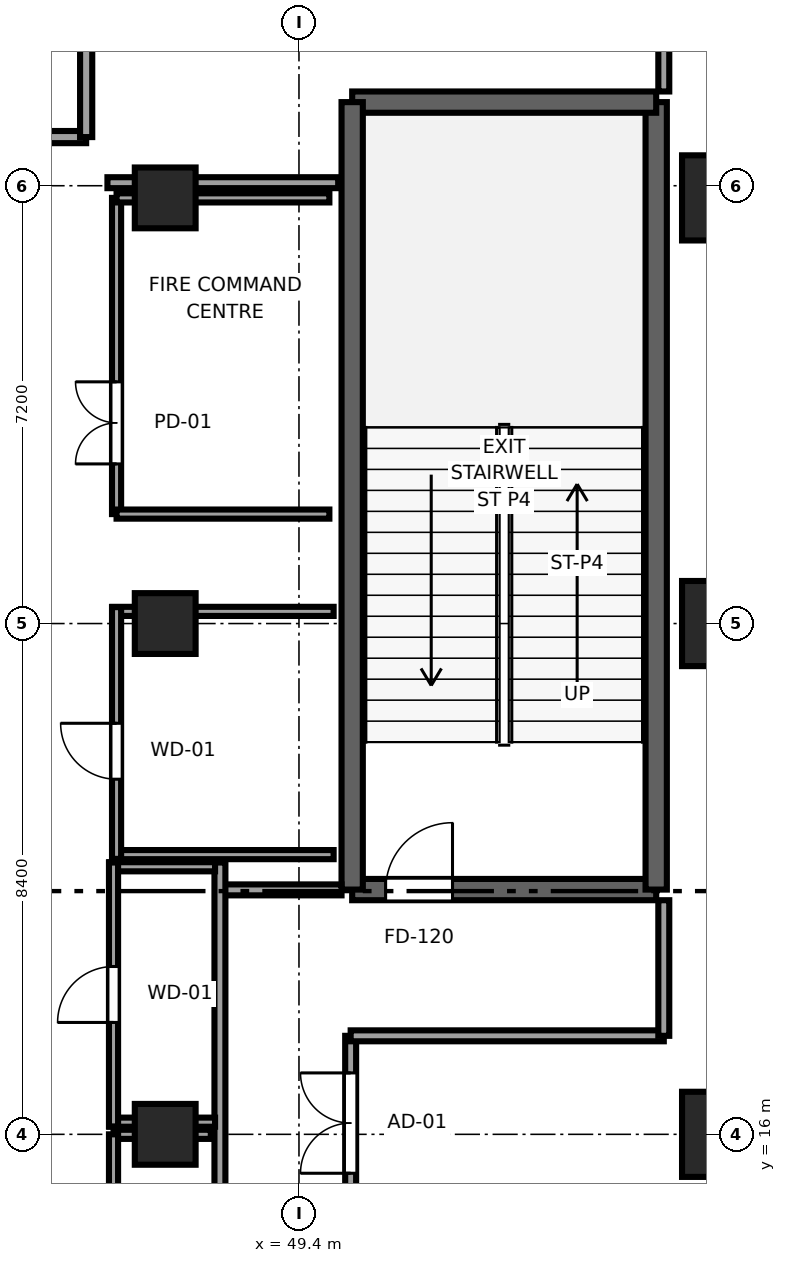
"""IFC4 building model, lengths in metres.
Left out: names, types, materials, properties, quantities, classifications, styles, units other than length and angle.
Written with IfcOpenShell. Run it as: python <this file> out.ifc"""

import sys

from ifc_helpers import new_model, si_unit, direction, frame, frame_2d, origin, origin_2d, place, context, subcontext, project, spatial, rectangle, extrude, source, transform, mapped, element, fill, save


model = new_model("IFC4")
c1 = context("Model", 3, precision=1e-05, world=origin(), true_north=direction((0.0, 1.0)))
c2 = subcontext(c1, "Body", "Model", "MODEL_VIEW")
j1 = project(units=[si_unit("LENGTHUNIT", "METRE"), si_unit("PLANEANGLEUNIT", "RADIAN")], contexts=[c1])
p1 = place(None, origin())
s1 = spatial("IfcSite", under=j1, at=p1, CompositionType="ELEMENT")
p2 = place(p1, origin())
s2 = spatial("IfcBuilding", under=s1, at=p2, CompositionType="ELEMENT")
p3 = place(p2, origin())
s3 = spatial("IfcBuildingStorey", under=s2, at=p3, CompositionType="ELEMENT", Elevation=0.0)
p4 = place(p3, frame((50.275, 20.025, 0.0), z_axis=(0.0, 0.0, 1.0), x_axis=(1.0, 0.0, 0.0)))
e1 = element("IfcWall", 1, at=p4, inside=s3, PredefinedType="SHEAR", context=c2, shape_type="SweptSolid", body=[
    extrude(rectangle(XDim=5.0, YDim=0.35, at=frame_2d((2.5, 0.0))), origin(), (0.0, 0.0, 1.0), 6.0),
])
p5 = place(p4, frame((1.65, 0.0, 0.0), z_axis=(0.0, 0.0, 1.0), x_axis=(-1.0, 0.0, 0.0)))
e2 = element("IfcOpeningElement", 2, at=p5, cuts=e1, PredefinedType="OPENING", context=c2, shape_type="SweptSolid", body=[
    extrude(rectangle(XDim=1.1, YDim=2.12, at=frame_2d((0.55, 1.06))), frame((0.0, 0.185, 0.0), z_axis=(0.0, -1.0, 0.0), x_axis=(1.0, 0.0, 0.0)), (0.0, 0.0, 1.0), 0.37),
])
p6 = place(p3, frame((55.275, 20.025, 0.0), z_axis=(0.0, 0.0, 1.0), x_axis=(0.0, 1.0, 0.0)))
e3 = element("IfcWall", 3, at=p6, inside=s3, PredefinedType="SHEAR", context=c2, shape_type="SweptSolid", body=[
    extrude(rectangle(XDim=12.95, YDim=0.35, at=frame_2d((6.475, 0.0))), origin(), (0.0, 0.0, 1.0), 6.0),
])
p7 = place(p3, frame((55.275, 32.975, 0.0), z_axis=(0.0, 0.0, 1.0), x_axis=(-1.0, 0.0, 0.0)))
e4 = element("IfcWall", 4, at=p7, inside=s3, PredefinedType="SHEAR", context=c2, shape_type="SweptSolid", body=[
    extrude(rectangle(XDim=5.0, YDim=0.35, at=frame_2d((2.5, 0.0))), origin(), (0.0, 0.0, 1.0), 6.0),
])
p8 = place(p3, frame((50.275, 32.975, 0.0), z_axis=(0.0, 0.0, 1.0), x_axis=(0.0, -1.0, 0.0)))
e5 = element("IfcWall", 5, at=p8, inside=s3, PredefinedType="SHEAR", context=c2, shape_type="SweptSolid", body=[
    extrude(rectangle(XDim=12.95, YDim=0.35, at=frame_2d((6.475, 0.0))), origin(), (0.0, 0.0, 1.0), 6.0),
])
m1 = source(origin(), c2, "Body", "SweptSolid", [
    extrude(rectangle(XDim=1.0, YDim=1.0, at=origin_2d()), origin(), (0.0, 0.0, 1.0), 6.0),
])
p9 = place(p3, frame((47.2, 16.0, 0.0), z_axis=(0.0, 0.0, 1.0), x_axis=(1.0, 0.0, 0.0)))
e6 = element("IfcColumn", 6, at=p9, inside=s3, PredefinedType="COLUMN", context=c2, shape_type="MappedRepresentation", body=[
    mapped(m1, transform((0.0, 0.0, 0.0), x_axis=(1.0, 0.0, 0.0), y_axis=(0.0, 1.0, 0.0), z_axis=(0.0, 0.0, 1.0), scale=1.0)),
])
m2 = source(origin(), c2, "Body", "SweptSolid", [
    extrude(rectangle(XDim=1.4, YDim=1.4, at=origin_2d()), origin(), (0.0, 0.0, 1.0), 6.0),
])
p10 = place(p3, frame((56.4, 16.0, 0.0), z_axis=(0.0, 0.0, 1.0), x_axis=(1.0, 0.0, 0.0)))
e7 = element("IfcColumn", 7, at=p10, inside=s3, PredefinedType="COLUMN", context=c2, shape_type="MappedRepresentation", body=[
    mapped(m2, transform((0.0, 0.0, 0.0), x_axis=(1.0, 0.0, 0.0), y_axis=(0.0, 1.0, 0.0), z_axis=(0.0, 0.0, 1.0), scale=1.0)),
])
p11 = place(p3, frame((47.2, 24.4, 0.0), z_axis=(0.0, 0.0, 1.0), x_axis=(1.0, 0.0, 0.0)))
e8 = element("IfcColumn", 8, at=p11, inside=s3, PredefinedType="COLUMN", context=c2, shape_type="MappedRepresentation", body=[
    mapped(m1, transform((0.0, 0.0, 0.0), x_axis=(1.0, 0.0, 0.0), y_axis=(0.0, 1.0, 0.0), z_axis=(0.0, 0.0, 1.0), scale=1.0)),
])
p12 = place(p3, frame((56.4, 24.4, 0.0), z_axis=(0.0, 0.0, 1.0), x_axis=(1.0, 0.0, 0.0)))
e9 = element("IfcColumn", 9, at=p12, inside=s3, PredefinedType="COLUMN", context=c2, shape_type="MappedRepresentation", body=[
    mapped(m2, transform((0.0, 0.0, 0.0), x_axis=(1.0, 0.0, 0.0), y_axis=(0.0, 1.0, 0.0), z_axis=(0.0, 0.0, 1.0), scale=1.0)),
])
p13 = place(p3, frame((47.2, 31.4, 0.0), z_axis=(0.0, 0.0, 1.0), x_axis=(1.0, 0.0, 0.0)))
e10 = element("IfcColumn", 10, at=p13, inside=s3, PredefinedType="COLUMN", context=c2, shape_type="MappedRepresentation", body=[
    mapped(m1, transform((0.0, 0.0, 0.0), x_axis=(1.0, 0.0, 0.0), y_axis=(0.0, 1.0, 0.0), z_axis=(0.0, 0.0, 1.0), scale=1.0)),
])
p14 = place(p3, frame((56.4, 31.4, 0.0), z_axis=(0.0, 0.0, 1.0), x_axis=(1.0, 0.0, 0.0)))
e11 = element("IfcColumn", 11, at=p14, inside=s3, PredefinedType="COLUMN", context=c2, shape_type="MappedRepresentation", body=[
    mapped(m2, transform((0.0, 0.0, 0.0), x_axis=(1.0, 0.0, 0.0), y_axis=(0.0, 1.0, 0.0), z_axis=(0.0, 0.0, 1.0), scale=1.0)),
])
p15 = place(p3, frame((42.45, 32.4, 0.0), z_axis=(0.0, 0.0, 1.0), x_axis=(1.0, 0.0, 0.0)))
e12 = element("IfcWall", 12, at=p15, inside=s3, PredefinedType="SOLIDWALL", context=c2, shape_type="SweptSolid", body=[
    extrude(rectangle(XDim=3.45, YDim=0.2, at=frame_2d((1.725, 0.0))), origin(), (0.0, 0.0, 1.0), 5.74),
])
p16 = place(p15, frame((1.65, 0.0, 0.0), z_axis=(0.0, 0.0, 1.0), x_axis=(-1.0, 0.0, 0.0)))
e13 = element("IfcOpeningElement", 13, at=p16, cuts=e12, PredefinedType="OPENING", context=c2, shape_type="SweptSolid", body=[
    extrude(rectangle(XDim=1.1, YDim=2.12, at=frame_2d((0.55, 1.06))), frame((0.0, 0.11, 0.0), z_axis=(0.0, -1.0, 0.0), x_axis=(1.0, 0.0, 0.0)), (0.0, 0.0, 1.0), 0.22),
])
p17 = place(p3, frame((45.9, 32.4, 0.0), z_axis=(0.0, 0.0, 1.0), x_axis=(0.0, 1.0, 0.0)))
e14 = element("IfcWall", 14, at=p17, inside=s3, PredefinedType="SOLIDWALL", context=c2, shape_type="SweptSolid", body=[
    extrude(rectangle(XDim=10.9, YDim=0.2, at=frame_2d((5.45, 0.0))), origin(), (0.0, 0.0, 1.0), 5.74),
])
p18 = place(p3, frame((46.25, 31.65, 0.0), z_axis=(0.0, 0.0, 1.0), x_axis=(1.0, 0.0, 0.0)))
e15 = element("IfcWall", 15, at=p18, inside=s3, PredefinedType="PARTITIONING", context=c2, shape_type="SweptSolid", body=[
    extrude(rectangle(XDim=3.795, YDim=0.18, at=frame_2d((1.897, 0.0))), origin(), (0.0, 0.0, 1.0), 5.74),
])
p19 = place(p3, frame((55.4, 33.15, 0.0), z_axis=(0.0, 0.0, 1.0), x_axis=(0.0, 1.0, 0.0)))
e16 = element("IfcWall", 16, at=p19, inside=s3, PredefinedType="PARTITIONING", context=c2, shape_type="SweptSolid", body=[
    extrude(rectangle(XDim=1.945, YDim=0.18, at=frame_2d((0.973, 0.0))), origin(), (0.0, 0.0, 1.0), 5.74),
])
p20 = place(p3, frame((50.25, 14.75, 0.0), z_axis=(0.0, 0.0, 1.0), x_axis=(0.0, 1.0, 0.0)))
e17 = element("IfcWall", 17, at=p20, inside=s3, PredefinedType="PARTITIONING", context=c2, shape_type="SweptSolid", body=[
    extrude(rectangle(XDim=2.87, YDim=0.18, at=frame_2d((1.435, 0.0))), origin(), (0.0, 0.0, 1.0), 5.74),
])
p21 = place(p20, frame((0.61, 0.0, 0.0)))
e18 = element("IfcOpeningElement", 18, at=p21, cuts=e17, PredefinedType="OPENING", context=c2, shape_type="SweptSolid", body=[
    extrude(rectangle(XDim=1.65, YDim=2.15, at=frame_2d((0.825, 1.075))), frame((0.0, 0.1, 0.0), z_axis=(0.0, -1.0, 0.0), x_axis=(1.0, 0.0, 0.0)), (0.0, 0.0, 1.0), 0.2),
])
p22 = place(p3, frame((50.25, 17.62, 0.0), z_axis=(0.0, 0.0, 1.0), x_axis=(1.0, 0.0, 0.0)))
e19 = element("IfcWall", 19, at=p22, inside=s3, PredefinedType="PARTITIONING", context=c2, shape_type="SweptSolid", body=[
    extrude(rectangle(XDim=5.15, YDim=0.18, at=frame_2d((2.575, 0.0))), origin(), (0.0, 0.0, 1.0), 5.74),
])
p23 = place(p3, frame((55.4, 17.62, 0.0), z_axis=(0.0, 0.0, 1.0), x_axis=(0.0, 1.0, 0.0)))
e20 = element("IfcWall", 20, at=p23, inside=s3, PredefinedType="PARTITIONING", context=c2, shape_type="SweptSolid", body=[
    extrude(rectangle(XDim=2.23, YDim=0.18, at=frame_2d((1.115, 0.0))), origin(), (0.0, 0.0, 1.0), 5.74),
])
p24 = place(p3, frame((48.1, 20.02, 0.0), z_axis=(0.0, 0.0, 1.0), x_axis=(1.0, 0.0, 0.0)))
e21 = element("IfcWall", 21, at=p24, inside=s3, PredefinedType="PARTITIONING", context=c2, shape_type="SweptSolid", body=[
    extrude(rectangle(XDim=2.0, YDim=0.18, at=frame_2d((1.0, 0.0))), origin(), (0.0, 0.0, 1.0), 5.74),
])
p25 = place(p3, frame((48.1, -2.025, 0.0), z_axis=(0.0, 0.0, 1.0), x_axis=(0.0, 1.0, 0.0)))
e22 = element("IfcWall", 22, at=p25, inside=s3, PredefinedType="PARTITIONING", context=c2, shape_type="SweptSolid", body=[
    extrude(rectangle(XDim=22.495, YDim=0.18, at=frame_2d((11.248, 0.0))), origin(), (0.0, 0.0, 1.0), 5.74),
])
p26 = place(p25, frame((12.048, 0.0, 0.0)))
e23 = element("IfcOpeningElement", 23, at=p26, cuts=e22, PredefinedType="OPENING", context=c2, shape_type="SweptSolid", body=[
    extrude(rectangle(XDim=3.2, YDim=2.8, at=frame_2d((1.6, 1.4))), frame((0.0, 0.1, 0.0), z_axis=(0.0, -1.0, 0.0), x_axis=(1.0, 0.0, 0.0)), (0.0, 0.0, 1.0), 0.2),
])
p27 = place(p3, frame((46.4, 26.2, 0.0), z_axis=(0.0, 0.0, 1.0), x_axis=(0.0, 1.0, 0.0)))
e24 = element("IfcWall", 24, at=p27, inside=s3, PredefinedType="PARTITIONING", context=c2, shape_type="SweptSolid", body=[
    extrude(rectangle(XDim=5.2, YDim=0.15, at=frame_2d((2.6, 0.0))), origin(), (0.0, 0.0, 1.0), 5.74),
])
p28 = place(p27, frame((0.825, 0.0, 0.0)))
e25 = element("IfcOpeningElement", 25, at=p28, cuts=e24, PredefinedType="OPENING", context=c2, shape_type="SweptSolid", body=[
    extrude(rectangle(XDim=1.35, YDim=2.15, at=frame_2d((0.675, 1.075))), frame((0.0, 0.085, 0.0), z_axis=(0.0, -1.0, 0.0), x_axis=(1.0, 0.0, 0.0)), (0.0, 0.0, 1.0), 0.17),
])
p29 = place(p3, frame((46.4, 26.2, 0.0), z_axis=(0.0, 0.0, 1.0), x_axis=(1.0, 0.0, 0.0)))
e26 = element("IfcWall", 26, at=p29, inside=s3, PredefinedType="PARTITIONING", context=c2, shape_type="SweptSolid", body=[
    extrude(rectangle(XDim=3.5, YDim=0.15, at=frame_2d((1.75, 0.0))), origin(), (0.0, 0.0, 1.0), 5.74),
])
p30 = place(p3, frame((46.4, 31.4, 0.0), z_axis=(0.0, 0.0, 1.0), x_axis=(1.0, 0.0, 0.0)))
e27 = element("IfcWall", 27, at=p30, inside=s3, PredefinedType="PARTITIONING", context=c2, shape_type="SweptSolid", body=[
    extrude(rectangle(XDim=3.5, YDim=0.15, at=frame_2d((1.75, 0.0))), origin(), (0.0, 0.0, 1.0), 4.914),
])
p31 = place(p3, frame((46.28, 16.2, 0.0), z_axis=(0.0, 0.0, 1.0), x_axis=(1.0, 0.0, 0.0)))
e28 = element("IfcWall", 28, at=p31, inside=s3, PredefinedType="PARTITIONING", context=c2, shape_type="SweptSolid", body=[
    extrude(rectangle(XDim=1.74, YDim=0.15, at=frame_2d((0.87, 0.0))), origin(), (0.0, 0.0, 1.0), 4.914),
])
p32 = place(p3, frame((46.28, 20.4, 0.0), z_axis=(0.0, 0.0, 1.0), x_axis=(1.0, 0.0, 0.0)))
e29 = element("IfcWall", 29, at=p32, inside=s3, PredefinedType="PARTITIONING", context=c2, shape_type="SweptSolid", body=[
    extrude(rectangle(XDim=1.74, YDim=0.15, at=frame_2d((0.87, 0.0))), origin(), (0.0, 0.0, 1.0), 5.74),
])
p33 = place(p3, frame((46.35, 16.13, 0.0), z_axis=(0.0, 0.0, 1.0), x_axis=(0.0, 1.0, 0.0)))
e30 = element("IfcWall", 30, at=p33, inside=s3, PredefinedType="PARTITIONING", context=c2, shape_type="SweptSolid", body=[
    extrude(rectangle(XDim=4.34, YDim=0.15, at=frame_2d((2.17, 0.0))), origin(), (0.0, 0.0, 1.0), 5.74),
])
p34 = place(p33, frame((1.71, 0.0, 0.0)))
e31 = element("IfcOpeningElement", 31, at=p34, cuts=e30, PredefinedType="OPENING", context=c2, shape_type="SweptSolid", body=[
    extrude(rectangle(XDim=0.92, YDim=2.01, at=frame_2d((0.46, 1.005))), frame((0.0, 0.085, 0.0), z_axis=(0.0, -1.0, 0.0), x_axis=(1.0, 0.0, 0.0)), (0.0, 0.0, 1.0), 0.17),
])
p35 = place(p3, frame((46.33, 20.6, 0.0), z_axis=(0.0, 0.0, 1.0), x_axis=(1.0, 0.0, 0.0)))
e32 = element("IfcWall", 32, at=p35, inside=s3, PredefinedType="PARTITIONING", context=c2, shape_type="SweptSolid", body=[
    extrude(rectangle(XDim=3.64, YDim=0.15, at=frame_2d((1.82, 0.0))), origin(), (0.0, 0.0, 1.0), 5.74),
])
p36 = place(p3, frame((46.33, 24.6, 0.0), z_axis=(0.0, 0.0, 1.0), x_axis=(1.0, 0.0, 0.0)))
e33 = element("IfcWall", 33, at=p36, inside=s3, PredefinedType="PARTITIONING", context=c2, shape_type="SweptSolid", body=[
    extrude(rectangle(XDim=3.64, YDim=0.15, at=frame_2d((1.82, 0.0))), origin(), (0.0, 0.0, 1.0), 4.914),
])
p37 = place(p3, frame((46.4, 20.53, 0.0), z_axis=(0.0, 0.0, 1.0), x_axis=(0.0, 1.0, 0.0)))
e34 = element("IfcWall", 34, at=p37, inside=s3, PredefinedType="PARTITIONING", context=c2, shape_type="SweptSolid", body=[
    extrude(rectangle(XDim=4.14, YDim=0.15, at=frame_2d((2.07, 0.0))), origin(), (0.0, 0.0, 1.0), 5.74),
])
p38 = place(p37, frame((1.31, 0.0, 0.0)))
e35 = element("IfcOpeningElement", 35, at=p38, cuts=e34, PredefinedType="OPENING", context=c2, shape_type="SweptSolid", body=[
    extrude(rectangle(XDim=0.92, YDim=2.01, at=frame_2d((0.46, 1.005))), frame((0.0, 0.085, 0.0), z_axis=(0.0, -1.0, 0.0), x_axis=(1.0, 0.0, 0.0)), (0.0, 0.0, 1.0), 0.17),
])
p39 = place(p3, frame((46.35, 16.0, 0.0), z_axis=(0.0, 0.0, 1.0), x_axis=(1.0, 0.0, 0.0)))
e36 = element("IfcWall", 36, at=p39, inside=s3, PredefinedType="PARTITIONING", context=c2, shape_type="SweptSolid", body=[
    extrude(rectangle(XDim=1.6, YDim=0.15, at=frame_2d((0.8, 0.0))), origin(), (0.0, 0.0, 1.0), 4.914),
])
p40 = place(p3, frame((46.35, 1.72, 0.0), z_axis=(0.0, 0.0, 1.0), x_axis=(0.0, 1.0, 0.0)))
e37 = element("IfcWall", 37, at=p40, inside=s3, PredefinedType="PARTITIONING", context=c2, shape_type="SweptSolid", body=[
    extrude(rectangle(XDim=14.28, YDim=0.15, at=frame_2d((7.14, 0.0))), origin(), (0.0, 0.0, 1.0), 5.74),
])
p41 = place(p40, frame((8.43, 0.0, 0.0)))
e38 = element("IfcOpeningElement", 38, at=p41, cuts=e37, PredefinedType="OPENING", context=c2, shape_type="SweptSolid", body=[
    extrude(rectangle(XDim=1.02, YDim=2.03, at=frame_2d((0.51, 1.015))), frame((0.0, 0.085, 0.0), z_axis=(0.0, -1.0, 0.0), x_axis=(1.0, 0.0, 0.0)), (0.0, 0.0, 1.0), 0.17),
])
m3 = source(origin(), c2, "Body", "SweptSolid", [
    extrude(rectangle(XDim=1.1, YDim=2.12, at=frame_2d((0.55, 1.06))), frame((0.0, 0.025, 0.0), z_axis=(0.0, -1.0, 0.0), x_axis=(1.0, 0.0, 0.0)), (0.0, 0.0, 1.0), 0.05),
])
p42 = place(p5, origin())
e39 = element("IfcDoor", 39, at=p42, inside=s3, OperationType="SINGLE_SWING_RIGHT", PredefinedType="DOOR", context=c2, shape_type="MappedRepresentation", body=[
    mapped(m3, transform((0.0, 0.0, 0.0), x_axis=(1.0, 0.0, 0.0), y_axis=(0.0, 1.0, 0.0), z_axis=(0.0, 0.0, 1.0), scale=1.0)),
])
fill(e2, e39)
m4 = source(origin(), c2, "Body", "SweptSolid", [
    extrude(rectangle(XDim=1.65, YDim=2.15, at=frame_2d((0.825, 1.075))), frame((0.0, 0.025, 0.0), z_axis=(0.0, -1.0, 0.0), x_axis=(1.0, 0.0, 0.0)), (0.0, 0.0, 1.0), 0.05),
])
p43 = place(p21, origin())
e40 = element("IfcDoor", 40, at=p43, inside=s3, OperationType="DOUBLE_DOOR_SINGLE_SWING", PredefinedType="DOOR", context=c2, shape_type="MappedRepresentation", body=[
    mapped(m4, transform((0.0, 0.0, 0.0), x_axis=(1.0, 0.0, 0.0), y_axis=(0.0, 1.0, 0.0), z_axis=(0.0, 0.0, 1.0), scale=1.0)),
])
fill(e18, e40)
m5 = source(origin(), c2, "Body", "SweptSolid", [
    extrude(rectangle(XDim=1.35, YDim=2.15, at=frame_2d((0.675, 1.075))), frame((0.0, 0.025, 0.0), z_axis=(0.0, -1.0, 0.0), x_axis=(1.0, 0.0, 0.0)), (0.0, 0.0, 1.0), 0.05),
])
p44 = place(p28, origin())
e41 = element("IfcDoor", 41, at=p44, inside=s3, OperationType="DOUBLE_DOOR_SINGLE_SWING", PredefinedType="DOOR", context=c2, shape_type="MappedRepresentation", body=[
    mapped(m5, transform((0.0, 0.0, 0.0), x_axis=(1.0, 0.0, 0.0), y_axis=(0.0, 1.0, 0.0), z_axis=(0.0, 0.0, 1.0), scale=1.0)),
])
fill(e25, e41)
m6 = source(origin(), c2, "Body", "SweptSolid", [
    extrude(rectangle(XDim=0.92, YDim=2.01, at=frame_2d((0.46, 1.005))), frame((0.0, 0.025, 0.0), z_axis=(0.0, -1.0, 0.0), x_axis=(1.0, 0.0, 0.0)), (0.0, 0.0, 1.0), 0.05),
])
p45 = place(p34, origin())
e42 = element("IfcDoor", 42, at=p45, inside=s3, OperationType="SINGLE_SWING_LEFT", PredefinedType="DOOR", context=c2, shape_type="MappedRepresentation", body=[
    mapped(m6, transform((0.0, 0.0, 0.0), x_axis=(1.0, 0.0, 0.0), y_axis=(0.0, 1.0, 0.0), z_axis=(0.0, 0.0, 1.0), scale=1.0)),
])
fill(e31, e42)
p46 = place(p38, origin())
e43 = element("IfcDoor", 43, at=p46, inside=s3, OperationType="SINGLE_SWING_RIGHT", PredefinedType="DOOR", context=c2, shape_type="MappedRepresentation", body=[
    mapped(m6, transform((0.0, 0.0, 0.0), x_axis=(1.0, 0.0, 0.0), y_axis=(0.0, 1.0, 0.0), z_axis=(0.0, 0.0, 1.0), scale=1.0)),
])
fill(e35, e43)
save(model, sys.argv[1])
